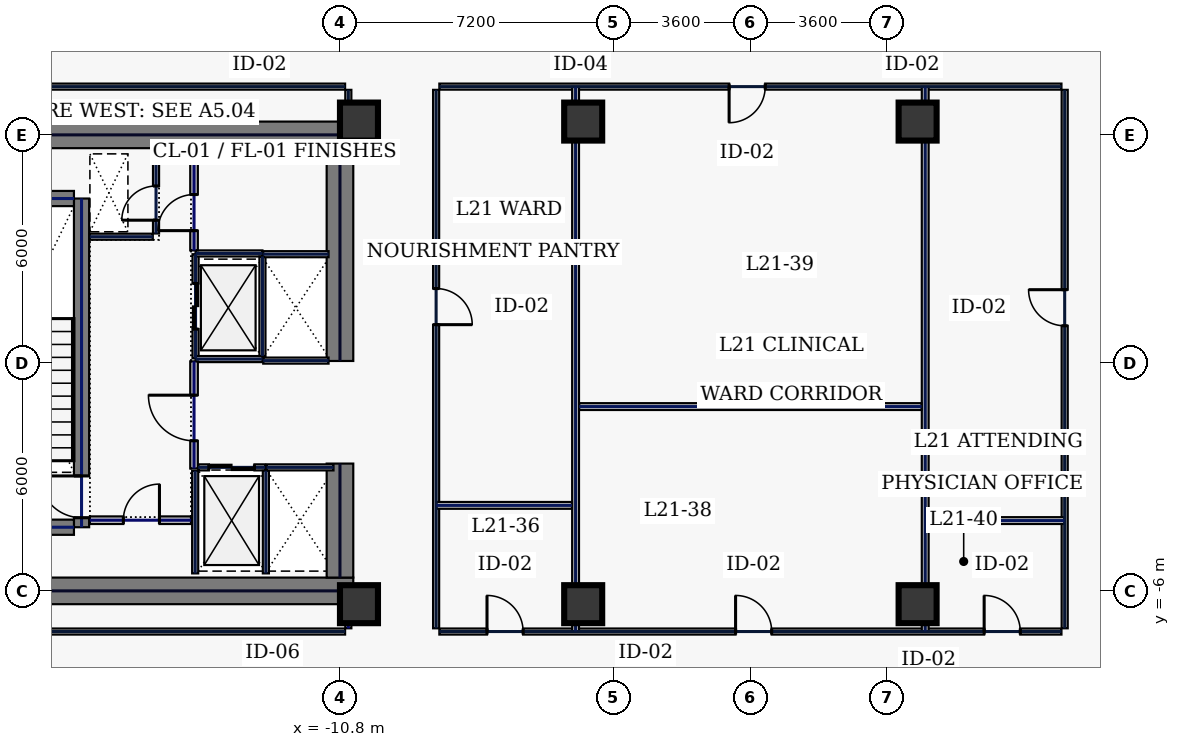
"""IFC4 building model, lengths in metres.
Left out: names, types, materials, properties, quantities, classifications, styles, units other than length and angle.
Written with IfcOpenShell. Run it as: python <this file> out.ifc"""

import sys

from ifc_helpers import new_model, si_unit, direction, frame, frame_2d, origin, origin_2d, place, context, subcontext, project, spatial, rectangle, hollow_rectangle, extrude, element, fill, save


model = new_model("IFC4")
c1 = context("Model", 3, precision=1e-05, world=origin(), true_north=direction((0.0, 1.0)))
c2 = subcontext(c1, "Body", "Model", "MODEL_VIEW")
j1 = project(units=[si_unit("LENGTHUNIT", "METRE"), si_unit("PLANEANGLEUNIT", "RADIAN")], contexts=[c1])
p1 = place(None, origin())
s1 = spatial("IfcSite", under=j1, at=p1, CompositionType="ELEMENT")
p2 = place(p1, origin())
s2 = spatial("IfcBuilding", under=s1, at=p2, CompositionType="ELEMENT")
p3 = place(p2, frame((0.0, 0.0, 97.4)))
s3 = spatial("IfcBuildingStorey", under=s2, at=p3, CompositionType="ELEMENT", Elevation=97.4)
for number, where, z_axis, x_axis in (
    (1, (-22.0, 6.0, 0.0), (0.0, 0.0, 1.0), (1.0, 0.0, 0.0)),
    (2, (-22.0, -6.0, 0.0), (0.0, 0.0, 1.0), (1.0, 0.0, 0.0)),
):
    element("IfcWall", number, at=place(p3, frame(where, z_axis=z_axis, x_axis=x_axis)), inside=s3, PredefinedType="SHEAR", context=c2, shape_type="SweptSolid", body=[
        extrude(rectangle(XDim=11.55, YDim=0.7, at=frame_2d((5.775, 0.0))), origin(), (0.0, 0.0, 1.0), 3.74),
    ])
p4 = place(p3, frame((-10.8, -5.65, 0.0), z_axis=(0.0, 0.0, 1.0), x_axis=(0.0, 1.0, 0.0)))
e3 = element("IfcWall", 3, at=p4, inside=s3, PredefinedType="SHEAR", context=c2, shape_type="SweptSolid", body=[
    extrude(rectangle(XDim=3.0, YDim=0.7, at=frame_2d((1.5, 0.0))), origin(), (0.0, 0.0, 1.0), 3.74),
])
p5 = place(p3, frame((-10.8, 0.05, 0.0), z_axis=(0.0, 0.0, 1.0), x_axis=(0.0, 1.0, 0.0)))
e4 = element("IfcWall", 4, at=p5, inside=s3, PredefinedType="SHEAR", context=c2, shape_type="SweptSolid", body=[
    extrude(rectangle(XDim=5.6, YDim=0.7, at=frame_2d((2.8, 0.0))), origin(), (0.0, 0.0, 1.0), 3.74),
])
p6 = place(p3, frame((-17.6, -4.325, 0.0), z_axis=(0.0, 0.0, 1.0), x_axis=(0.0, 1.0, 0.0)))
e5 = element("IfcWall", 5, at=p6, inside=s3, PredefinedType="SHEAR", context=c2, shape_type="SweptSolid", body=[
    extrude(rectangle(XDim=8.65, YDim=0.4, at=frame_2d((4.325, 0.0))), origin(), (0.0, 0.0, 1.0), 3.74),
])
p7 = place(p6, frame((0.25, 0.0, 0.0)))
e6 = element("IfcOpeningElement", 6, at=p7, cuts=e5, PredefinedType="OPENING", context=c2, shape_type="SweptSolid", body=[
    extrude(rectangle(XDim=1.1, YDim=2.2, at=frame_2d((0.55, 1.1))), frame((0.0, 0.21, 0.0), z_axis=(0.0, -1.0, 0.0), x_axis=(1.0, 0.0, 0.0)), (0.0, 0.0, 1.0), 0.42),
])
for number, where, z_axis, x_axis in (
    (7, (-21.2, -4.325, 0.0), (0.0, 0.0, 1.0), (1.0, 0.0, 0.0)),
    (8, (-21.2, 4.325, 0.0), (0.0, 0.0, 1.0), (1.0, 0.0, 0.0)),
):
    element("IfcWall", number, at=place(p3, frame(where, z_axis=z_axis, x_axis=x_axis)), inside=s3, PredefinedType="SHEAR", context=c2, shape_type="SweptSolid", body=[
        extrude(rectangle(XDim=3.4, YDim=0.4, at=frame_2d((1.7, 0.0))), origin(), (0.0, 0.0, 1.0), 3.74),
    ])
for number, where, z_axis, x_axis in (
    (9, (-10.3, -6.35, 0.0), (0.0, 0.0, 1.0), (1.0, 0.0, 0.0)),
    (10, (-10.3, 6.35, 0.0), (0.0, 0.0, 1.0), (1.0, 0.0, 0.0)),
    (11, (-4.4, -6.35, 0.0), (0.0, 0.0, 1.0), (1.0, 0.0, 0.0)),
    (12, (4.4, -6.35, 0.0), (0.0, 0.0, 1.0), (1.0, 0.0, 0.0)),
    (13, (-4.4, 6.35, 0.0), (0.0, 0.0, 1.0), (1.0, 0.0, 0.0)),
    (14, (4.4, 6.35, 0.0), (0.0, 0.0, 1.0), (1.0, 0.0, 0.0)),
):
    element("IfcColumn", number, at=place(p3, frame(where, z_axis=z_axis, x_axis=x_axis)), inside=s3, PredefinedType="COLUMN", context=c2, shape_type="SweptSolid", body=[
        extrude(hollow_rectangle(XDim=1.0, YDim=1.0, WallThickness=0.045, at=origin_2d()), origin(), (0.0, 0.0, 1.0), 3.74),
    ])
p8 = place(p3, frame((-14.6, 0.12, 0.0), z_axis=(0.0, 0.0, 1.0), x_axis=(0.0, 1.0, 0.0)))
e15 = element("IfcWall", 15, at=p8, inside=s3, PredefinedType="PARTITIONING", context=c2, shape_type="SweptSolid", body=[
    extrude(rectangle(XDim=2.74, YDim=0.16, at=frame_2d((1.37, 0.0))), origin(), (0.0, 0.0, 1.0), 3.74),
])
p9 = place(p8, frame((0.77, 0.0, 0.0)))
e16 = element("IfcOpeningElement", 16, at=p9, cuts=e15, PredefinedType="OPENING", context=c2, shape_type="SweptSolid", body=[
    extrude(rectangle(XDim=1.2, YDim=2.2, at=frame_2d((0.6, 1.1))), frame((0.0, 0.09, 0.0), z_axis=(0.0, -1.0, 0.0), x_axis=(1.0, 0.0, 0.0)), (0.0, 0.0, 1.0), 0.18),
])
for number, where, z_axis, x_axis in (
    (17, (-14.6, 0.1, 0.0), (0.0, 0.0, 1.0), (1.0, 0.0, 0.0)),
    (18, (-14.6, 2.88, 0.0), (0.0, 0.0, 1.0), (1.0, 0.0, 0.0)),
):
    element("IfcWall", number, at=place(p3, frame(where, z_axis=z_axis, x_axis=x_axis)), inside=s3, PredefinedType="PARTITIONING", context=c2, shape_type="SweptSolid", body=[
        extrude(rectangle(XDim=1.76, YDim=0.16, at=frame_2d((0.88, 0.0))), origin(), (0.0, 0.0, 1.0), 3.74),
    ])
p10 = place(p3, frame((-12.84, 0.18, 0.0), z_axis=(0.0, 0.0, 1.0), x_axis=(0.0, 1.0, 0.0)))
e19 = element("IfcWall", 19, at=p10, inside=s3, PredefinedType="PARTITIONING", context=c2, shape_type="SweptSolid", body=[
    extrude(rectangle(XDim=2.62, YDim=0.16, at=frame_2d((1.31, 0.0))), origin(), (0.0, 0.0, 1.0), 3.74),
])
p11 = place(p3, frame((-14.53, -2.75, 0.0), z_axis=(0.0, 0.0, 1.0), x_axis=(1.0, 0.0, 0.0)))
e20 = element("IfcWall", 20, at=p11, inside=s3, PredefinedType="PARTITIONING", context=c2, shape_type="SweptSolid", body=[
    extrude(rectangle(XDim=1.76, YDim=0.16, at=frame_2d((0.88, 0.0))), origin(), (0.0, 0.0, 1.0), 3.74),
])
p12 = place(p11, frame((0.28, 0.0, 0.0)))
e21 = element("IfcOpeningElement", 21, at=p12, cuts=e20, PredefinedType="OPENING", context=c2, shape_type="SweptSolid", body=[
    extrude(rectangle(XDim=1.2, YDim=2.2, at=frame_2d((0.6, 1.1))), frame((0.0, 0.09, 0.0), z_axis=(0.0, -1.0, 0.0), x_axis=(1.0, 0.0, 0.0)), (0.0, 0.0, 1.0), 0.18),
])
for number, where, z_axis, x_axis in (
    (22, (-12.75, -5.54, 0.0), (0.0, 0.0, 1.0), (0.0, 1.0, 0.0)),
    (23, (-14.61, -5.54, 0.0), (0.0, 0.0, 1.0), (0.0, 1.0, 0.0)),
):
    element("IfcWall", number, at=place(p3, frame(where, z_axis=z_axis, x_axis=x_axis)), inside=s3, PredefinedType="PARTITIONING", context=c2, shape_type="SweptSolid", body=[
        extrude(rectangle(XDim=2.7, YDim=0.16, at=frame_2d((1.35, 0.0))), origin(), (0.0, 0.0, 1.0), 3.74),
    ])
p13 = place(p3, frame((-12.73, -2.75, 0.0), z_axis=(0.0, 0.0, 1.0), x_axis=(1.0, 0.0, 0.0)))
e24 = element("IfcWall", 24, at=p13, inside=s3, PredefinedType="PARTITIONING", context=c2, shape_type="SweptSolid", body=[
    extrude(rectangle(XDim=1.76, YDim=0.16, at=frame_2d((0.88, 0.0))), origin(), (0.0, 0.0, 1.0), 3.74),
])
for number, where, z_axis, x_axis in (
    (25, (-12.82, 0.06, 0.0), (0.0, 0.0, 1.0), (1.0, 0.0, 0.0)),
    (26, (-12.82, 2.86, 0.0), (0.0, 0.0, 1.0), (1.0, 0.0, 0.0)),
):
    element("IfcWall", number, at=place(p3, frame(where, z_axis=z_axis, x_axis=x_axis)), inside=s3, PredefinedType="PARTITIONING", context=c2, shape_type="SweptSolid", body=[
        extrude(rectangle(XDim=1.72, YDim=0.16, at=frame_2d((0.86, 0.0))), origin(), (0.0, 0.0, 1.0), 3.74),
    ])
p14 = place(p3, frame((-15.64, 3.405, 0.0), z_axis=(0.0, 0.0, 1.0), x_axis=(0.0, 1.0, 0.0)))
e27 = element("IfcWall", 27, at=p14, inside=s3, PredefinedType="PARTITIONING", context=c2, shape_type="SweptSolid", body=[
    extrude(rectangle(XDim=2.155, YDim=0.16, at=frame_2d((1.078, 0.0))), origin(), (0.0, 0.0, 1.0), 3.74),
])
p15 = place(p14, frame((0.35, 0.0, 0.0)))
e28 = element("IfcOpeningElement", 28, at=p15, cuts=e27, PredefinedType="OPENING", context=c2, shape_type="SweptSolid", body=[
    extrude(rectangle(XDim=0.9, YDim=2.2, at=frame_2d((0.45, 1.1))), frame((0.0, 0.09, 0.0), z_axis=(0.0, -1.0, 0.0), x_axis=(1.0, 0.0, 0.0)), (0.0, 0.0, 1.0), 0.18),
])
p16 = place(p3, frame((-17.38, 3.32, 0.0), z_axis=(0.0, 0.0, 1.0), x_axis=(1.0, 0.0, 0.0)))
e29 = element("IfcWall", 29, at=p16, inside=s3, PredefinedType="PARTITIONING", context=c2, shape_type="SweptSolid", body=[
    extrude(rectangle(XDim=1.655, YDim=0.16, at=frame_2d((0.827, 0.0))), origin(), (0.0, 0.0, 1.0), 3.74),
])
p17 = place(p3, frame((-17.38, -4.14, 0.0), z_axis=(0.0, 0.0, 1.0), x_axis=(1.0, 0.0, 0.0)))
e30 = element("IfcWall", 30, at=p17, inside=s3, PredefinedType="SOLIDWALL", context=c2, shape_type="SweptSolid", body=[
    extrude(rectangle(XDim=2.66, YDim=0.2, at=frame_2d((1.33, 0.0))), origin(), (0.0, 0.0, 1.0), 3.74),
])
p18 = place(p17, frame((0.88, 0.0, 0.0)))
e31 = element("IfcOpeningElement", 31, at=p18, cuts=e30, PredefinedType="OPENING", context=c2, shape_type="SweptSolid", body=[
    extrude(rectangle(XDim=0.95, YDim=2.2, at=frame_2d((0.475, 1.1))), frame((0.0, 0.11, 0.0), z_axis=(0.0, -1.0, 0.0), x_axis=(1.0, 0.0, 0.0)), (0.0, 0.0, 1.0), 0.22),
])
p19 = place(p3, frame((-14.64, 2.96, 0.0), z_axis=(0.0, 0.0, 1.0), x_axis=(0.0, 1.0, 0.0)))
e32 = element("IfcWall", 32, at=p19, inside=s3, PredefinedType="SOLIDWALL", context=c2, shape_type="SweptSolid", body=[
    extrude(rectangle(XDim=2.6, YDim=0.2, at=frame_2d((1.3, 0.0))), origin(), (0.0, 0.0, 1.0), 3.74),
])
p20 = place(p19, frame((0.52, 0.0, 0.0)))
e33 = element("IfcOpeningElement", 33, at=p20, cuts=e32, PredefinedType="OPENING", context=c2, shape_type="SweptSolid", body=[
    extrude(rectangle(XDim=0.95, YDim=2.2, at=frame_2d((0.475, 1.1))), frame((0.0, 0.11, 0.0), z_axis=(0.0, -1.0, 0.0), x_axis=(1.0, 0.0, 0.0)), (0.0, 0.0, 1.0), 0.22),
])
p21 = place(p3, frame((-14.64, -2.78, 0.0), z_axis=(0.0, 0.0, 1.0), x_axis=(0.0, 1.0, 0.0)))
e34 = element("IfcWall", 34, at=p21, inside=s3, PredefinedType="SOLIDWALL", context=c2, shape_type="SweptSolid", body=[
    extrude(rectangle(XDim=2.82, YDim=0.2, at=frame_2d((1.41, 0.0))), origin(), (0.0, 0.0, 1.0), 3.74),
])
p22 = place(p21, frame((0.73, 0.0, 0.0)))
e35 = element("IfcOpeningElement", 35, at=p22, cuts=e34, PredefinedType="OPENING", context=c2, shape_type="SweptSolid", body=[
    extrude(rectangle(XDim=1.2, YDim=2.2, at=frame_2d((0.6, 1.1))), frame((0.0, 0.11, 0.0), z_axis=(0.0, -1.0, 0.0), x_axis=(1.0, 0.0, 0.0)), (0.0, 0.0, 1.0), 0.22),
])
p23 = place(p3, frame((8.27, -6.985, 0.0), z_axis=(0.0, 0.0, 1.0), x_axis=(0.0, 1.0, 0.0)))
e36 = element("IfcWall", 36, at=p23, inside=s3, PredefinedType="PARTITIONING", context=c2, shape_type="SweptSolid", body=[
    extrude(rectangle(XDim=14.17, YDim=0.16, at=frame_2d((7.085, 0.0))), origin(), (0.0, 0.0, 1.0), 3.74),
])
p24 = place(p23, frame((7.961, 0.0, 0.0)))
e37 = element("IfcOpeningElement", 37, at=p24, cuts=e36, PredefinedType="OPENING", context=c2, shape_type="SweptSolid", body=[
    extrude(rectangle(XDim=0.95, YDim=2.2, at=frame_2d((0.475, 1.1))), frame((0.0, 0.09, 0.0), z_axis=(0.0, -1.0, 0.0), x_axis=(1.0, 0.0, 0.0)), (0.0, 0.0, 1.0), 0.18),
])
p25 = place(p3, frame((8.185, 7.27, 0.0), z_axis=(0.0, 0.0, 1.0), x_axis=(-1.0, 0.0, 0.0)))
e38 = element("IfcWall", 38, at=p25, inside=s3, PredefinedType="PARTITIONING", context=c2, shape_type="SweptSolid", body=[
    extrude(rectangle(XDim=16.37, YDim=0.16, at=frame_2d((8.185, 0.0))), origin(), (0.0, 0.0, 1.0), 3.74),
])
p26 = place(p25, frame((7.795, 0.0, 0.0)))
e39 = element("IfcOpeningElement", 39, at=p26, cuts=e38, PredefinedType="OPENING", context=c2, shape_type="SweptSolid", body=[
    extrude(rectangle(XDim=0.95, YDim=2.2, at=frame_2d((0.475, 1.1))), frame((0.0, 0.09, 0.0), z_axis=(0.0, -1.0, 0.0), x_axis=(1.0, 0.0, 0.0)), (0.0, 0.0, 1.0), 0.18),
])
p27 = place(p3, frame((-8.27, 7.185, 0.0), z_axis=(0.0, 0.0, 1.0), x_axis=(0.0, -1.0, 0.0)))
e40 = element("IfcWall", 40, at=p27, inside=s3, PredefinedType="PARTITIONING", context=c2, shape_type="SweptSolid", body=[
    extrude(rectangle(XDim=14.17, YDim=0.16, at=frame_2d((7.085, 0.0))), origin(), (0.0, 0.0, 1.0), 3.74),
])
p28 = place(p27, frame((5.229, 0.0, 0.0)))
e41 = element("IfcOpeningElement", 41, at=p28, cuts=e40, PredefinedType="OPENING", context=c2, shape_type="SweptSolid", body=[
    extrude(rectangle(XDim=0.95, YDim=2.2, at=frame_2d((0.475, 1.1))), frame((0.0, 0.09, 0.0), z_axis=(0.0, -1.0, 0.0), x_axis=(1.0, 0.0, 0.0)), (0.0, 0.0, 1.0), 0.18),
])
p29 = place(p3, frame((-8.185, -7.07, 0.0), z_axis=(0.0, 0.0, 1.0), x_axis=(1.0, 0.0, 0.0)))
e42 = element("IfcWall", 42, at=p29, inside=s3, PredefinedType="PARTITIONING", context=c2, shape_type="SweptSolid", body=[
    extrude(rectangle(XDim=16.37, YDim=0.16, at=frame_2d((8.185, 0.0))), origin(), (0.0, 0.0, 1.0), 3.74),
])
p30 = place(p29, frame((1.254, 0.0, 0.0)))
e43 = element("IfcOpeningElement", 43, at=p30, cuts=e42, PredefinedType="OPENING", context=c2, shape_type="SweptSolid", body=[
    extrude(rectangle(XDim=0.95, YDim=2.2, at=frame_2d((0.475, 1.1))), frame((0.0, 0.09, 0.0), z_axis=(0.0, -1.0, 0.0), x_axis=(1.0, 0.0, 0.0)), (0.0, 0.0, 1.0), 0.18),
])
p31 = place(p29, frame((7.795, 0.0, 0.0)))
e44 = element("IfcOpeningElement", 44, at=p31, cuts=e42, PredefinedType="OPENING", context=c2, shape_type="SweptSolid", body=[
    extrude(rectangle(XDim=0.95, YDim=2.2, at=frame_2d((0.475, 1.1))), frame((0.0, 0.09, 0.0), z_axis=(0.0, -1.0, 0.0), x_axis=(1.0, 0.0, 0.0)), (0.0, 0.0, 1.0), 0.18),
])
p32 = place(p29, frame((14.336, 0.0, 0.0)))
e45 = element("IfcOpeningElement", 45, at=p32, cuts=e42, PredefinedType="OPENING", context=c2, shape_type="SweptSolid", body=[
    extrude(rectangle(XDim=0.95, YDim=2.2, at=frame_2d((0.475, 1.1))), frame((0.0, 0.09, 0.0), z_axis=(0.0, -1.0, 0.0), x_axis=(1.0, 0.0, 0.0)), (0.0, 0.0, 1.0), 0.18),
])
p33 = place(p3, frame((-10.58, -6.985, 0.0), z_axis=(0.0, 0.0, 1.0), x_axis=(0.0, 1.0, 0.0)))
e46 = element("IfcWall", 46, at=p33, inside=s3, PredefinedType="PARTITIONING", context=c2, shape_type="SweptSolid", body=[
    extrude(rectangle(XDim=0.565, YDim=0.16, at=frame_2d((0.283, 0.0))), origin(), (0.0, 0.0, 1.0), 1.535),
])
p34 = place(p3, frame((-10.58, 6.42, 0.0), z_axis=(0.0, 0.0, 1.0), x_axis=(0.0, 1.0, 0.0)))
e47 = element("IfcWall", 47, at=p34, inside=s3, PredefinedType="PARTITIONING", context=c2, shape_type="SweptSolid", body=[
    extrude(rectangle(XDim=0.765, YDim=0.16, at=frame_2d((0.383, 0.0))), origin(), (0.0, 0.0, 1.0), 3.74),
])
for number, where, z_axis, x_axis in (
    (48, (-10.665, 7.27, 0.0), (0.0, 0.0, 1.0), (-1.0, 0.0, 0.0)),
    (49, (-25.235, -7.07, 0.0), (0.0, 0.0, 1.0), (1.0, 0.0, 0.0)),
):
    element("IfcWall", number, at=place(p3, frame(where, z_axis=z_axis, x_axis=x_axis)), inside=s3, PredefinedType="PARTITIONING", context=c2, shape_type="SweptSolid", body=[
        extrude(rectangle(XDim=14.57, YDim=0.16, at=frame_2d((7.285, 0.0))), origin(), (0.0, 0.0, 1.0), 3.74),
    ])
for number, where, z_axis, x_axis in (
    (50, (-4.6, -7.065, 0.0), (0.0, 0.0, 1.0), (0.0, 1.0, 0.0)),
    (51, (4.6, -7.065, 0.0), (0.0, 0.0, 1.0), (0.0, 1.0, 0.0)),
):
    element("IfcWall", number, at=place(p3, frame(where, z_axis=z_axis, x_axis=x_axis)), inside=s3, PredefinedType="PARTITIONING", context=c2, shape_type="SweptSolid", body=[
        extrude(rectangle(XDim=14.33, YDim=0.18, at=frame_2d((7.165, 0.0))), origin(), (0.0, 0.0, 1.0), 2.935),
    ])
p35 = place(p3, frame((-4.505, -1.15, 0.0), z_axis=(0.0, 0.0, 1.0), x_axis=(1.0, 0.0, 0.0)))
e52 = element("IfcWall", 52, at=p35, inside=s3, PredefinedType="PARTITIONING", context=c2, shape_type="SweptSolid", body=[
    extrude(rectangle(XDim=9.01, YDim=0.18, at=frame_2d((4.505, 0.0))), origin(), (0.0, 0.0, 1.0), 3.74),
])
for number, where, z_axis, x_axis in (
    (53, (-8.265, -3.75, 0.0), (0.0, 0.0, 1.0), (1.0, 0.0, 0.0)),
    (54, (4.695, -4.15, 0.0), (0.0, 0.0, 1.0), (1.0, 0.0, 0.0)),
):
    element("IfcWall", number, at=place(p3, frame(where, z_axis=z_axis, x_axis=x_axis)), inside=s3, PredefinedType="PARTITIONING", context=c2, shape_type="SweptSolid", body=[
        extrude(rectangle(XDim=3.57, YDim=0.18, at=frame_2d((1.785, 0.0))), origin(), (0.0, 0.0, 1.0), 3.74),
    ])
p36 = place(p7, origin())
e55 = element("IfcDoor", 55, at=p36, inside=s3, OperationType="SINGLE_SWING_RIGHT", PredefinedType="DOOR", context=c2, shape_type="SweptSolid", body=[
    extrude(rectangle(XDim=1.1, YDim=2.2, at=frame_2d((0.55, 1.1))), frame((0.0, 0.025, 0.0), z_axis=(0.0, -1.0, 0.0), x_axis=(1.0, 0.0, 0.0)), (0.0, 0.0, 1.0), 0.05),
])
fill(e6, e55)
p37 = place(p9, origin())
e56 = element("IfcDoor", 56, at=p37, inside=s3, OperationType="SLIDING_TO_LEFT", PredefinedType="DOOR", context=c2, shape_type="SweptSolid", body=[
    extrude(rectangle(XDim=1.2, YDim=2.2, at=frame_2d((0.6, 1.1))), frame((0.0, 0.025, 0.0), z_axis=(0.0, -1.0, 0.0), x_axis=(1.0, 0.0, 0.0)), (0.0, 0.0, 1.0), 0.05),
])
fill(e16, e56)
p38 = place(p12, origin())
e57 = element("IfcDoor", 57, at=p38, inside=s3, OperationType="SLIDING_TO_LEFT", PredefinedType="DOOR", context=c2, shape_type="SweptSolid", body=[
    extrude(rectangle(XDim=1.2, YDim=2.2, at=frame_2d((0.6, 1.1))), frame((0.0, 0.025, 0.0), z_axis=(0.0, -1.0, 0.0), x_axis=(1.0, 0.0, 0.0)), (0.0, 0.0, 1.0), 0.05),
])
fill(e21, e57)
p39 = place(p15, origin())
e58 = element("IfcDoor", 58, at=p39, inside=s3, OperationType="SINGLE_SWING_LEFT", PredefinedType="DOOR", context=c2, shape_type="SweptSolid", body=[
    extrude(rectangle(XDim=0.9, YDim=2.2, at=frame_2d((0.45, 1.1))), frame((0.0, 0.025, 0.0), z_axis=(0.0, -1.0, 0.0), x_axis=(1.0, 0.0, 0.0)), (0.0, 0.0, 1.0), 0.05),
])
fill(e28, e58)
p40 = place(p18, origin())
e59 = element("IfcDoor", 59, at=p40, inside=s3, OperationType="SINGLE_SWING_RIGHT", PredefinedType="DOOR", context=c2, shape_type="SweptSolid", body=[
    extrude(rectangle(XDim=0.95, YDim=2.2, at=frame_2d((0.475, 1.1))), frame((0.0, 0.025, 0.0), z_axis=(0.0, -1.0, 0.0), x_axis=(1.0, 0.0, 0.0)), (0.0, 0.0, 1.0), 0.05),
])
fill(e31, e59)
p41 = place(p20, origin())
e60 = element("IfcDoor", 60, at=p41, inside=s3, OperationType="SINGLE_SWING_LEFT", PredefinedType="DOOR", context=c2, shape_type="SweptSolid", body=[
    extrude(rectangle(XDim=0.95, YDim=2.2, at=frame_2d((0.475, 1.1))), frame((0.0, 0.025, 0.0), z_axis=(0.0, -1.0, 0.0), x_axis=(1.0, 0.0, 0.0)), (0.0, 0.0, 1.0), 0.05),
])
fill(e33, e60)
p42 = place(p22, origin())
e61 = element("IfcDoor", 61, at=p42, inside=s3, OperationType="SINGLE_SWING_RIGHT", PredefinedType="DOOR", context=c2, shape_type="SweptSolid", body=[
    extrude(rectangle(XDim=1.2, YDim=2.2, at=frame_2d((0.6, 1.1))), frame((0.0, 0.025, 0.0), z_axis=(0.0, -1.0, 0.0), x_axis=(1.0, 0.0, 0.0)), (0.0, 0.0, 1.0), 0.05),
])
fill(e35, e61)
p43 = place(p30, origin())
e62 = element("IfcDoor", 62, at=p43, inside=s3, OperationType="SINGLE_SWING_LEFT", PredefinedType="DOOR", context=c2, shape_type="SweptSolid", body=[
    extrude(rectangle(XDim=0.95, YDim=2.2, at=frame_2d((0.475, 1.1))), frame((0.0, 0.025, 0.0), z_axis=(0.0, -1.0, 0.0), x_axis=(1.0, 0.0, 0.0)), (0.0, 0.0, 1.0), 0.05),
])
fill(e43, e62)
p44 = place(p28, origin())
e63 = element("IfcDoor", 63, at=p44, inside=s3, OperationType="SINGLE_SWING_RIGHT", PredefinedType="DOOR", context=c2, shape_type="SweptSolid", body=[
    extrude(rectangle(XDim=0.95, YDim=2.2, at=frame_2d((0.475, 1.1))), frame((0.0, 0.025, 0.0), z_axis=(0.0, -1.0, 0.0), x_axis=(1.0, 0.0, 0.0)), (0.0, 0.0, 1.0), 0.05),
])
fill(e41, e63)
p45 = place(p31, origin())
e64 = element("IfcDoor", 64, at=p45, inside=s3, OperationType="SINGLE_SWING_LEFT", PredefinedType="DOOR", context=c2, shape_type="SweptSolid", body=[
    extrude(rectangle(XDim=0.95, YDim=2.2, at=frame_2d((0.475, 1.1))), frame((0.0, 0.025, 0.0), z_axis=(0.0, -1.0, 0.0), x_axis=(1.0, 0.0, 0.0)), (0.0, 0.0, 1.0), 0.05),
])
fill(e44, e64)
p46 = place(p26, origin())
e65 = element("IfcDoor", 65, at=p46, inside=s3, OperationType="SINGLE_SWING_RIGHT", PredefinedType="DOOR", context=c2, shape_type="SweptSolid", body=[
    extrude(rectangle(XDim=0.95, YDim=2.2, at=frame_2d((0.475, 1.1))), frame((0.0, 0.025, 0.0), z_axis=(0.0, -1.0, 0.0), x_axis=(1.0, 0.0, 0.0)), (0.0, 0.0, 1.0), 0.05),
])
fill(e39, e65)
p47 = place(p32, origin())
e66 = element("IfcDoor", 66, at=p47, inside=s3, OperationType="SINGLE_SWING_LEFT", PredefinedType="DOOR", context=c2, shape_type="SweptSolid", body=[
    extrude(rectangle(XDim=0.95, YDim=2.2, at=frame_2d((0.475, 1.1))), frame((0.0, 0.025, 0.0), z_axis=(0.0, -1.0, 0.0), x_axis=(1.0, 0.0, 0.0)), (0.0, 0.0, 1.0), 0.05),
])
fill(e45, e66)
p48 = place(p24, origin())
e67 = element("IfcDoor", 67, at=p48, inside=s3, OperationType="SINGLE_SWING_RIGHT", PredefinedType="DOOR", context=c2, shape_type="SweptSolid", body=[
    extrude(rectangle(XDim=0.95, YDim=2.2, at=frame_2d((0.475, 1.1))), frame((0.0, 0.025, 0.0), z_axis=(0.0, -1.0, 0.0), x_axis=(1.0, 0.0, 0.0)), (0.0, 0.0, 1.0), 0.05),
])
fill(e37, e67)
save(model, sys.argv[1])
